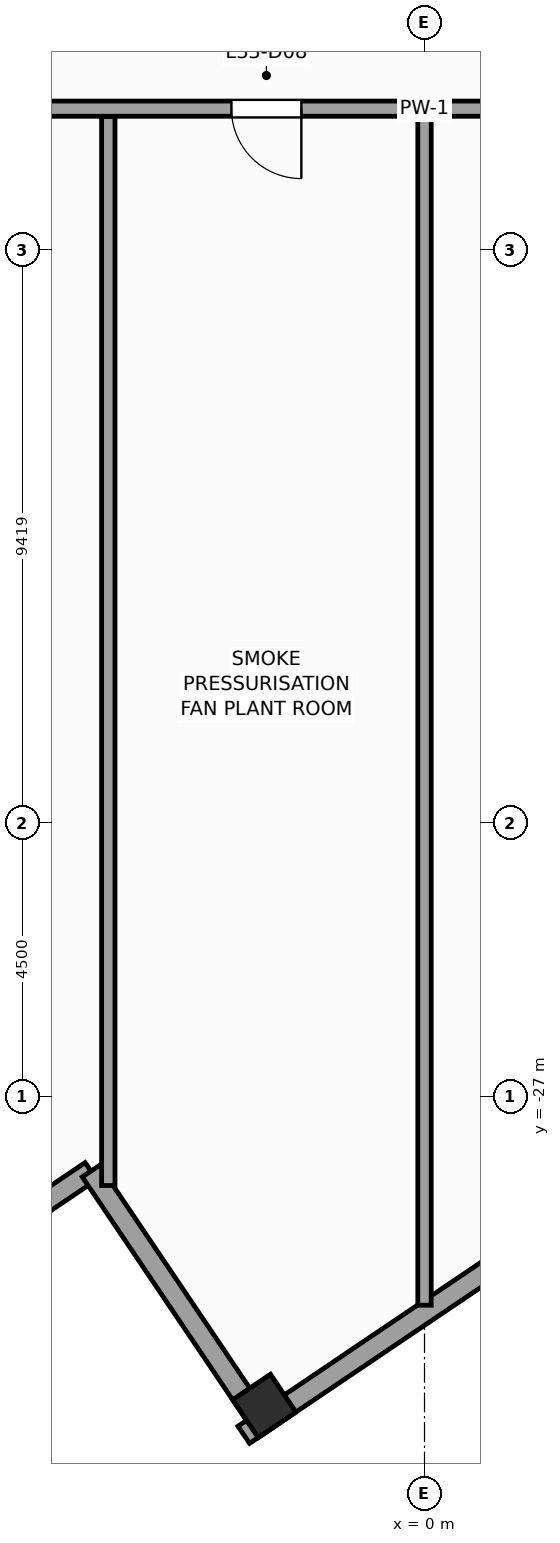
"""IFC4 building model, lengths in metres.
Left out: names, types, materials, properties, quantities, classifications, styles, units other than length and angle.
Written with IfcOpenShell. Run it as: python <this file> out.ifc"""

import sys

from ifc_helpers import new_model, si_unit, direction, frame, frame_2d, origin, origin_2d, place, context, subcontext, project, spatial, rectangle, extrude, source, transform, mapped, element, fill, save


model = new_model("IFC4")
c1 = context("Model", 3, precision=1e-05, world=origin(), true_north=direction((0.0, 1.0)))
c2 = subcontext(c1, "Body", "Model", "MODEL_VIEW")
j1 = project(units=[si_unit("LENGTHUNIT", "METRE"), si_unit("PLANEANGLEUNIT", "RADIAN")], contexts=[c1])
p1 = place(None, origin())
s1 = spatial("IfcSite", under=j1, at=p1, CompositionType="ELEMENT")
p2 = place(p1, origin())
s2 = spatial("IfcBuilding", under=s1, at=p2, CompositionType="ELEMENT")
p3 = place(p2, frame((0.0, 0.0, 139.2)))
s3 = spatial("IfcBuildingStorey", under=s2, at=p3, CompositionType="ELEMENT", Elevation=139.2)
m1 = source(origin(), c2, "Body", "SweptSolid", [
    extrude(rectangle(XDim=0.75, YDim=0.75, at=origin_2d()), origin(), (0.0, 0.0, 1.0), 5.2),
])
p4 = place(p3, frame((-2.635, -32.083, 0.0), z_axis=(0.0, 0.0, 1.0), x_axis=(0.829037572555, 0.559192903471, 0.0)))
e1 = element("IfcColumn", 1, at=p4, inside=s3, PredefinedType="COLUMN", context=c2, shape_type="MappedRepresentation", body=[
    mapped(m1, transform((0.0, 0.0, 0.0), scale=1.0)),
])
p5 = place(p3, frame((-9.631, -31.019, 0.0), z_axis=(0.0, 0.0, 1.0), x_axis=(0.829025804298, 0.559210350234, 0.0)))
e2 = element("IfcWall", 2, at=p5, inside=s3, PredefinedType="STANDARD", context=c2, shape_type="SweptSolid", body=[
    extrude(rectangle(XDim=5.0, YDim=0.34, at=frame_2d((2.5, 0.0))), origin(), (0.0, 0.0, 1.0), 4.94),
])
p6 = place(p3, frame((-5.486, -28.223, 0.0), z_axis=(0.0, 0.0, 1.0), x_axis=(0.559171107879, -0.82905227345, 0.0)))
e3 = element("IfcWall", 3, at=p6, inside=s3, PredefinedType="STANDARD", context=c2, shape_type="SweptSolid", body=[
    extrude(rectangle(XDim=5.17, YDim=0.34, at=frame_2d((2.585, 0.0))), origin(), (0.0, 0.0, 1.0), 4.24),
])
p7 = place(p3, frame((-2.972, -32.558, 0.0), z_axis=(0.0, 0.0, 1.0), x_axis=(0.82903231094, 0.559200704056, 0.0)))
e4 = element("IfcWall", 4, at=p7, inside=s3, PredefinedType="STANDARD", context=c2, shape_type="SweptSolid", body=[
    extrude(rectangle(XDim=15.27, YDim=0.34, at=frame_2d((7.635, 0.0))), origin(), (0.0, 0.0, 1.0), 4.34),
])
p8 = place(p7, frame((12.27, 0.0, 0.0)))
e5 = element("IfcOpeningElement", 5, at=p8, cuts=e4, PredefinedType="OPENING", context=c2, shape_type="SweptSolid", body=[
    extrude(rectangle(XDim=1.2, YDim=2.3, at=frame_2d((0.6, 1.15))), frame((0.0, 0.18, 0.0), z_axis=(0.0, -1.0, 0.0), x_axis=(1.0, 0.0, 0.0)), (0.0, 0.0, 1.0), 0.36),
])
p9 = place(p3, frame((-10.75, -10.75, 0.0), z_axis=(0.0, 0.0, 1.0), x_axis=(1.0, 0.0, 0.0)))
e6 = element("IfcWall", 6, at=p9, inside=s3, PredefinedType="PARTITIONING", context=c2, shape_type="SweptSolid", body=[
    extrude(rectangle(XDim=21.5, YDim=0.25, at=frame_2d((10.75, 0.0))), origin(), (0.0, 0.0, 1.0), 4.94),
])
p10 = place(p9, frame((17.986, 0.0, 0.0)))
e7 = element("IfcOpeningElement", 7, at=p10, cuts=e6, PredefinedType="OPENING", context=c2, shape_type="SweptSolid", body=[
    extrude(rectangle(XDim=1.15, YDim=2.25, at=frame_2d((0.575, 1.125))), frame((0.0, 0.135, 0.0), z_axis=(0.0, -1.0, 0.0), x_axis=(1.0, 0.0, 0.0)), (0.0, 0.0, 1.0), 0.27),
])
p11 = place(p9, frame((12.775, 0.0, 0.0)))
e8 = element("IfcOpeningElement", 8, at=p11, cuts=e6, PredefinedType="OPENING", context=c2, shape_type="SweptSolid", body=[
    extrude(rectangle(XDim=1.15, YDim=2.25, at=frame_2d((0.575, 1.125))), frame((0.0, 0.135, 0.0), z_axis=(0.0, -1.0, 0.0), x_axis=(1.0, 0.0, 0.0)), (0.0, 0.0, 1.0), 0.27),
])
p12 = place(p9, frame((7.575, 0.0, 0.0)))
e9 = element("IfcOpeningElement", 9, at=p12, cuts=e6, PredefinedType="OPENING", context=c2, shape_type="SweptSolid", body=[
    extrude(rectangle(XDim=1.15, YDim=2.25, at=frame_2d((0.575, 1.125))), frame((0.0, 0.135, 0.0), z_axis=(0.0, -1.0, 0.0), x_axis=(1.0, 0.0, 0.0)), (0.0, 0.0, 1.0), 0.27),
])
p13 = place(p9, frame((2.365, 0.0, 0.0)))
e10 = element("IfcOpeningElement", 10, at=p13, cuts=e6, PredefinedType="OPENING", context=c2, shape_type="SweptSolid", body=[
    extrude(rectangle(XDim=1.15, YDim=2.25, at=frame_2d((0.575, 1.125))), frame((0.0, 0.135, 0.0), z_axis=(0.0, -1.0, 0.0), x_axis=(1.0, 0.0, 0.0)), (0.0, 0.0, 1.0), 0.27),
])
p14 = place(p3, frame((-5.2, -10.88, 0.0), z_axis=(0.0, 0.0, 1.0), x_axis=(0.0, -1.0, 0.0)))
e11 = element("IfcWall", 11, at=p14, inside=s3, PredefinedType="PARTITIONING", context=c2, shape_type="SweptSolid", body=[
    extrude(rectangle(XDim=17.579, YDim=0.22, at=frame_2d((8.79, 0.0))), origin(), (0.0, 0.0, 1.0), 4.94),
])
p15 = place(p3, frame((0.0, -10.88, 0.0), z_axis=(0.0, 0.0, 1.0), x_axis=(0.0, -1.0, 0.0)))
e12 = element("IfcWall", 12, at=p15, inside=s3, PredefinedType="PARTITIONING", context=c2, shape_type="SweptSolid", body=[
    extrude(rectangle(XDim=19.547, YDim=0.22, at=frame_2d((9.773, 0.0))), origin(), (0.0, 0.0, 1.0), 4.94),
])
m2 = source(origin(), c2, "Body", "SweptSolid", [
    extrude(rectangle(XDim=1.15, YDim=2.25, at=frame_2d((0.575, 1.125))), frame((0.0, 0.025, 0.0), z_axis=(0.0, -1.0, 0.0), x_axis=(1.0, 0.0, 0.0)), (0.0, 0.0, 1.0), 0.05),
])
p16 = place(p12, frame((1.15, 0.0, 0.0), z_axis=(0.0, 0.0, 1.0), x_axis=(-1.0, 0.0, 0.0)))
e13 = element("IfcDoor", 13, at=p16, inside=s3, OperationType="SINGLE_SWING_RIGHT", PredefinedType="DOOR", context=c2, shape_type="MappedRepresentation", body=[
    mapped(m2, transform((0.0, 0.0, 0.0), scale=1.0)),
])
fill(e9, e13)
save(model, sys.argv[1])
